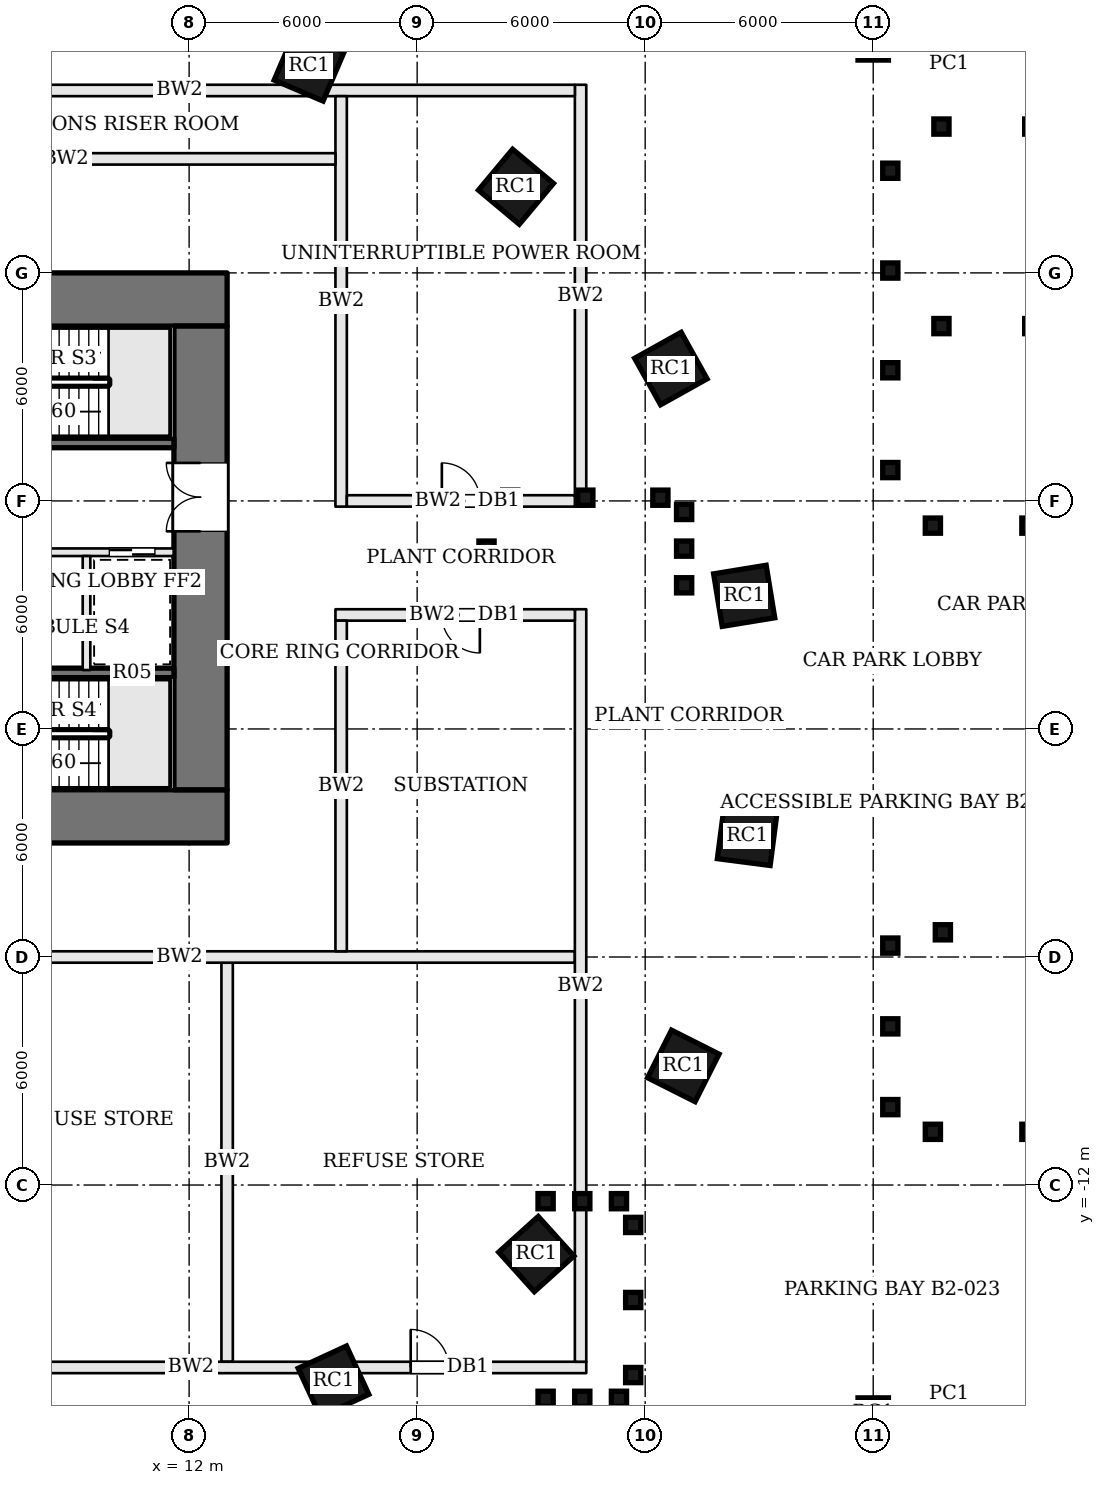
"""IFC4 building model, lengths in metres.
Left out: names, types, materials, properties, quantities, classifications, styles, units other than length and angle.
Written with IfcOpenShell. Run it as: python <this file> out.ifc"""

import sys

from ifc_helpers import new_model, si_unit, direction, frame, frame_2d, origin, origin_2d, place, context, subcontext, project, spatial, rectangle, extrude, element, fill, save


model = new_model("IFC4")
c1 = context("Model", 3, precision=1e-05, world=origin(), true_north=direction((0.0, 1.0)))
c2 = subcontext(c1, "Body", "Model", "MODEL_VIEW")
j1 = project(units=[si_unit("LENGTHUNIT", "METRE"), si_unit("PLANEANGLEUNIT", "RADIAN")], contexts=[c1])
p1 = place(None, origin())
s1 = spatial("IfcSite", under=j1, at=p1, CompositionType="ELEMENT")
p2 = place(p1, origin())
s2 = spatial("IfcBuilding", under=s1, at=p2, CompositionType="ELEMENT")
p3 = place(p2, frame((0.0, 0.0, -10.5)))
s3 = spatial("IfcBuildingStorey", under=s2, at=p3, CompositionType="ELEMENT", Elevation=-10.5)
for number, where, z_axis, x_axis in (
    (1, (30.0, -18.0, 0.0), (0.0, 0.0, 1.0), (1.0, 0.0, 0.0)),
    (2, (30.0, 18.0, 0.0), (0.0, 0.0, 1.0), (1.0, 0.0, 0.0)),
):
    element("IfcColumn", number, at=place(p3, frame(where, z_axis=z_axis, x_axis=x_axis)), inside=s3, PredefinedType="COLUMN", context=c2, shape_type="SweptSolid", body=[
        extrude(rectangle(XDim=0.8, YDim=0.8, at=origin_2d()), origin(), (0.0, 0.0, 1.0), 4.5),
    ])
p4 = place(p3, frame((-13.0, 11.3, 0.0), z_axis=(0.0, 0.0, 1.0), x_axis=(1.0, 0.0, 0.0)))
e3 = element("IfcWall", 3, at=p4, inside=s3, PredefinedType="SHEAR", context=c2, shape_type="SweptSolid", body=[
    extrude(rectangle(XDim=26.0, YDim=1.4, at=frame_2d((13.0, 0.0))), origin(), (0.0, 0.0, 1.0), 4.5),
])
p5 = place(p4, frame((9.55, 0.0, 0.0)))
e4 = element("IfcOpeningElement", 4, at=p5, cuts=e3, PredefinedType="OPENING", context=c2, shape_type="SweptSolid", body=[
    extrude(rectangle(XDim=1.2, YDim=2.1, at=frame_2d((0.6, 1.05))), frame((0.0, 0.71, 0.0), z_axis=(0.0, -1.0, 0.0), x_axis=(1.0, 0.0, 0.0)), (0.0, 0.0, 1.0), 1.42),
])
p6 = place(p4, frame((13.075, 0.0, 0.0)))
e5 = element("IfcOpeningElement", 5, at=p6, cuts=e3, PredefinedType="OPENING", context=c2, shape_type="SweptSolid", body=[
    extrude(rectangle(XDim=0.7, YDim=2.1, at=frame_2d((0.35, 1.05))), frame((0.0, 0.71, 0.0), z_axis=(0.0, -1.0, 0.0), x_axis=(1.0, 0.0, 0.0)), (0.0, 0.0, 1.0), 1.42),
])
p7 = place(p4, frame((15.925, 0.0, 0.0)))
e6 = element("IfcOpeningElement", 6, at=p7, cuts=e3, PredefinedType="OPENING", context=c2, shape_type="SweptSolid", body=[
    extrude(rectangle(XDim=0.7, YDim=2.1, at=frame_2d((0.35, 1.05))), frame((0.0, 0.71, 0.0), z_axis=(0.0, -1.0, 0.0), x_axis=(1.0, 0.0, 0.0)), (0.0, 0.0, 1.0), 1.42),
])
p8 = place(p3, frame((-13.0, -2.3, 0.0), z_axis=(0.0, 0.0, 1.0), x_axis=(1.0, 0.0, 0.0)))
e7 = element("IfcWall", 7, at=p8, inside=s3, PredefinedType="SHEAR", context=c2, shape_type="SweptSolid", body=[
    extrude(rectangle(XDim=26.0, YDim=1.4, at=frame_2d((13.0, 0.0))), origin(), (0.0, 0.0, 1.0), 4.5),
])
p9 = place(p8, frame((8.725, 0.0, 0.0)))
e8 = element("IfcOpeningElement", 8, at=p9, cuts=e7, PredefinedType="OPENING", context=c2, shape_type="SweptSolid", body=[
    extrude(rectangle(XDim=1.2, YDim=2.1, at=frame_2d((0.6, 1.05))), frame((0.0, 0.71, 0.0), z_axis=(0.0, -1.0, 0.0), x_axis=(1.0, 0.0, 0.0)), (0.0, 0.0, 1.0), 1.42),
])
p10 = place(p8, frame((12.0, 0.0, 0.0)))
e9 = element("IfcOpeningElement", 9, at=p10, cuts=e7, PredefinedType="OPENING", context=c2, shape_type="SweptSolid", body=[
    extrude(rectangle(XDim=1.2, YDim=2.1, at=frame_2d((0.6, 1.05))), frame((0.0, 0.71, 0.0), z_axis=(0.0, -1.0, 0.0), x_axis=(1.0, 0.0, 0.0)), (0.0, 0.0, 1.0), 1.42),
])
p11 = place(p8, frame((15.675, 0.0, 0.0)))
e10 = element("IfcOpeningElement", 10, at=p11, cuts=e7, PredefinedType="OPENING", context=c2, shape_type="SweptSolid", body=[
    extrude(rectangle(XDim=1.2, YDim=2.1, at=frame_2d((0.6, 1.05))), frame((0.0, 0.71, 0.0), z_axis=(0.0, -1.0, 0.0), x_axis=(1.0, 0.0, 0.0)), (0.0, 0.0, 1.0), 1.42),
])
p12 = place(p3, frame((12.3, -1.6, 0.0), z_axis=(0.0, 0.0, 1.0), x_axis=(0.0, 1.0, 0.0)))
e11 = element("IfcWall", 11, at=p12, inside=s3, PredefinedType="SHEAR", context=c2, shape_type="SweptSolid", body=[
    extrude(rectangle(XDim=12.2, YDim=1.4, at=frame_2d((6.1, 0.0))), origin(), (0.0, 0.0, 1.0), 4.5),
])
p13 = place(p12, frame((6.8, 0.0, 0.0)))
e12 = element("IfcOpeningElement", 12, at=p13, cuts=e11, PredefinedType="OPENING", context=c2, shape_type="SweptSolid", body=[
    extrude(rectangle(XDim=1.8, YDim=2.1, at=frame_2d((0.9, 1.05))), frame((0.0, 0.71, 0.0), z_axis=(0.0, -1.0, 0.0), x_axis=(1.0, 0.0, 0.0)), (0.0, 0.0, 1.0), 1.42),
])
for number, where, z_axis, x_axis in (
    (13, (26.605, 3.503, 0.0), (0.0, 0.0, 1.0), (-0.161, 0.987, 0.0)),
    (14, (24.676, 9.483, 0.0), (0.0, 0.0, 1.0), (-0.487, 0.873, 0.0)),
    (15, (20.6, 14.266, 0.0), (0.0, 0.0, 1.0), (-0.767, 0.641, 0.0)),
    (16, (15.157, 17.441, 0.0), (0.0, 0.0, 1.0), (-0.919, 0.394, 0.0)),
    (17, (15.799, -17.165, 0.0), (0.0, 0.0, 1.0), (0.908, 0.419, 0.0)),
    (18, (21.135, -13.817, 0.0), (0.0, 0.0, 1.0), (0.743, 0.67, 0.0)),
    (19, (25.003, -8.866, 0.0), (0.0, 0.0, 1.0), (0.45, 0.893, 0.0)),
    (20, (26.684, -2.808, 0.0), (0.0, 0.0, 1.0), (0.128, 0.992, 0.0)),
):
    element("IfcColumn", number, at=place(p3, frame(where, z_axis=z_axis, x_axis=x_axis)), inside=s3, PredefinedType="COLUMN", context=c2, shape_type="SweptSolid", body=[
        extrude(rectangle(XDim=1.4, YDim=1.4, at=origin_2d()), origin(), (0.0, 0.0, 1.0), 4.5),
    ])
for number, where, z_axis, x_axis in (
    (21, (32.0, 17.5, 0.0), (0.0, 0.0, 1.0), (1.0, 0.0, 0.0)),
    (22, (32.0, -17.5, 0.0), (0.0, 0.0, 1.0), (1.0, 0.0, 0.0)),
):
    element("IfcColumn", number, at=place(p3, frame(where, z_axis=z_axis, x_axis=x_axis)), inside=s3, PredefinedType="COLUMN", context=c2, shape_type="SweptSolid", body=[
        extrude(rectangle(XDim=0.4, YDim=0.4, at=origin_2d()), origin(), (0.0, 0.0, 1.0), 4.5),
    ])
p14 = place(p3, frame((11.6, 7.525, 0.0), z_axis=(0.0, 0.0, 1.0), x_axis=(-1.0, 0.0, 0.0)))
e23 = element("IfcWall", 23, at=p14, inside=s3, PredefinedType="SOLIDWALL", context=c2, shape_type="SweptSolid", body=[
    extrude(rectangle(XDim=6.5, YDim=0.25, at=frame_2d((3.25, 0.0))), origin(), (0.0, 0.0, 1.0), 4.2),
])
p15 = place(p14, frame((5.2, 0.0, 0.0)))
e24 = element("IfcOpeningElement", 24, at=p15, cuts=e23, PredefinedType="OPENING", context=c2, shape_type="SweptSolid", body=[
    extrude(rectangle(XDim=1.2, YDim=2.1, at=frame_2d((0.6, 1.05))), frame((0.0, 0.135, 0.0), z_axis=(0.0, -1.0, 0.0), x_axis=(1.0, 0.0, 0.0)), (0.0, 0.0, 1.0), 0.27),
])
p16 = place(p3, frame((11.6, 4.65, 0.0), z_axis=(0.0, 0.0, 1.0), x_axis=(-1.0, 0.0, 0.0)))
e25 = element("IfcWall", 25, at=p16, inside=s3, PredefinedType="SOLIDWALL", context=c2, shape_type="SweptSolid", body=[
    extrude(rectangle(XDim=6.5, YDim=0.2, at=frame_2d((3.25, 0.0))), origin(), (0.0, 0.0, 1.0), 4.2),
])
p17 = place(p16, frame((3.8, 0.0, 0.0)))
e26 = element("IfcOpeningElement", 26, at=p17, cuts=e25, PredefinedType="OPENING", context=c2, shape_type="SweptSolid", body=[
    extrude(rectangle(XDim=1.2, YDim=2.1, at=frame_2d((0.6, 1.05))), frame((0.0, 0.11, 0.0), z_axis=(0.0, -1.0, 0.0), x_axis=(1.0, 0.0, 0.0)), (0.0, 0.0, 1.0), 0.22),
])
p18 = place(p16, frame((0.5, 0.0, 0.0)))
e27 = element("IfcOpeningElement", 27, at=p18, cuts=e25, PredefinedType="OPENING", context=c2, shape_type="SweptSolid", body=[
    extrude(rectangle(XDim=1.2, YDim=2.1, at=frame_2d((0.6, 1.05))), frame((0.0, 0.11, 0.0), z_axis=(0.0, -1.0, 0.0), x_axis=(1.0, 0.0, 0.0)), (0.0, 0.0, 1.0), 0.22),
])
p19 = place(p3, frame((11.6, 1.475, 0.0), z_axis=(0.0, 0.0, 1.0), x_axis=(-1.0, 0.0, 0.0)))
e28 = element("IfcWall", 28, at=p19, inside=s3, PredefinedType="SOLIDWALL", context=c2, shape_type="SweptSolid", body=[
    extrude(rectangle(XDim=6.5, YDim=0.25, at=frame_2d((3.25, 0.0))), origin(), (0.0, 0.0, 1.0), 4.2),
])
p20 = place(p19, frame((5.2, 0.0, 0.0)))
e29 = element("IfcOpeningElement", 29, at=p20, cuts=e28, PredefinedType="OPENING", context=c2, shape_type="SweptSolid", body=[
    extrude(rectangle(XDim=1.2, YDim=2.1, at=frame_2d((0.6, 1.05))), frame((0.0, 0.135, 0.0), z_axis=(0.0, -1.0, 0.0), x_axis=(1.0, 0.0, 0.0)), (0.0, 0.0, 1.0), 0.27),
])
p21 = place(p3, frame((9.3, 4.55, 0.0), z_axis=(0.0, 0.0, 1.0), x_axis=(0.0, -1.0, 0.0)))
e30 = element("IfcWall", 30, at=p21, inside=s3, PredefinedType="SOLIDWALL", context=c2, shape_type="SweptSolid", body=[
    extrude(rectangle(XDim=3.0, YDim=0.2, at=frame_2d((1.5, 0.0))), origin(), (0.0, 0.0, 1.0), 4.2),
])
p22 = place(p3, frame((13.0, -16.65, 0.0), z_axis=(0.0, 0.0, 1.0), x_axis=(0.0, 1.0, 0.0)))
e31 = element("IfcWall", 31, at=p22, inside=s3, PredefinedType="SOLIDWALL", context=c2, shape_type="SweptSolid", body=[
    extrude(rectangle(XDim=10.5, YDim=0.3, at=frame_2d((5.25, 0.0))), origin(), (0.0, 0.0, 1.0), 3.48),
])
p23 = place(p3, frame((22.15, -6.0, 0.0), z_axis=(0.0, 0.0, 1.0), x_axis=(-1.0, 0.0, 0.0)))
e32 = element("IfcWall", 32, at=p23, inside=s3, PredefinedType="SOLIDWALL", context=c2, shape_type="SweptSolid", body=[
    extrude(rectangle(XDim=20.8, YDim=0.3, at=frame_2d((10.4, 0.0))), origin(), (0.0, 0.0, 1.0), 3.48),
])
p24 = place(p3, frame((1.65, -16.8, 0.0), z_axis=(0.0, 0.0, 1.0), x_axis=(1.0, 0.0, 0.0)))
e33 = element("IfcWall", 33, at=p24, inside=s3, PredefinedType="SOLIDWALL", context=c2, shape_type="SweptSolid", body=[
    extrude(rectangle(XDim=20.8, YDim=0.3, at=frame_2d((10.4, 0.0))), origin(), (0.0, 0.0, 1.0), 3.48),
])
p25 = place(p24, frame((16.18, 0.0, 0.0)))
e34 = element("IfcOpeningElement", 34, at=p25, cuts=e33, PredefinedType="OPENING", context=c2, shape_type="SweptSolid", body=[
    extrude(rectangle(XDim=1.0, YDim=2.1, at=frame_2d((0.5, 1.05))), frame((0.0, 0.16, 0.0), z_axis=(0.0, -1.0, 0.0), x_axis=(1.0, 0.0, 0.0)), (0.0, 0.0, 1.0), 0.32),
])
p26 = place(p3, frame((22.3, -16.65, 0.0), z_axis=(0.0, 0.0, 1.0), x_axis=(0.0, 1.0, 0.0)))
e35 = element("IfcWall", 35, at=p26, inside=s3, PredefinedType="SOLIDWALL", context=c2, shape_type="SweptSolid", body=[
    extrude(rectangle(XDim=19.8, YDim=0.3, at=frame_2d((9.9, 0.0))), origin(), (0.0, 0.0, 1.0), 3.48),
])
p27 = place(p3, frame((22.15, 3.0, 0.0), z_axis=(0.0, 0.0, 1.0), x_axis=(-1.0, 0.0, 0.0)))
e36 = element("IfcWall", 36, at=p27, inside=s3, PredefinedType="SOLIDWALL", context=c2, shape_type="SweptSolid", body=[
    extrude(rectangle(XDim=6.3, YDim=0.3, at=frame_2d((3.15, 0.0))), origin(), (0.0, 0.0, 1.0), 3.48),
])
p28 = place(p27, frame((2.5, 0.0, 0.0)))
e37 = element("IfcOpeningElement", 37, at=p28, cuts=e36, PredefinedType="OPENING", context=c2, shape_type="SweptSolid", body=[
    extrude(rectangle(XDim=1.0, YDim=2.1, at=frame_2d((0.5, 1.05))), frame((0.0, 0.16, 0.0), z_axis=(0.0, -1.0, 0.0), x_axis=(1.0, 0.0, 0.0)), (0.0, 0.0, 1.0), 0.32),
])
p29 = place(p3, frame((16.0, 2.85, 0.0), z_axis=(0.0, 0.0, 1.0), x_axis=(0.0, -1.0, 0.0)))
e38 = element("IfcWall", 38, at=p29, inside=s3, PredefinedType="SOLIDWALL", context=c2, shape_type="SweptSolid", body=[
    extrude(rectangle(XDim=8.7, YDim=0.3, at=frame_2d((4.35, 0.0))), origin(), (0.0, 0.0, 1.0), 3.48),
])
p30 = place(p3, frame((22.3, 5.85, 0.0), z_axis=(0.0, 0.0, 1.0), x_axis=(0.0, 1.0, 0.0)))
e39 = element("IfcWall", 39, at=p30, inside=s3, PredefinedType="SOLIDWALL", context=c2, shape_type="SweptSolid", body=[
    extrude(rectangle(XDim=11.1, YDim=0.3, at=frame_2d((5.55, 0.0))), origin(), (0.0, 0.0, 1.0), 3.48),
])
p31 = place(p3, frame((22.15, 16.8, 0.0), z_axis=(0.0, 0.0, 1.0), x_axis=(-1.0, 0.0, 0.0)))
e40 = element("IfcWall", 40, at=p31, inside=s3, PredefinedType="SOLIDWALL", context=c2, shape_type="SweptSolid", body=[
    extrude(rectangle(XDim=20.8, YDim=0.3, at=frame_2d((10.4, 0.0))), origin(), (0.0, 0.0, 1.0), 3.48),
])
p32 = place(p3, frame((16.0, 16.65, 0.0), z_axis=(0.0, 0.0, 1.0), x_axis=(0.0, -1.0, 0.0)))
e41 = element("IfcWall", 41, at=p32, inside=s3, PredefinedType="SOLIDWALL", context=c2, shape_type="SweptSolid", body=[
    extrude(rectangle(XDim=10.8, YDim=0.3, at=frame_2d((5.4, 0.0))), origin(), (0.0, 0.0, 1.0), 3.48),
])
p33 = place(p3, frame((16.15, 6.0, 0.0), z_axis=(0.0, 0.0, 1.0), x_axis=(1.0, 0.0, 0.0)))
e42 = element("IfcWall", 42, at=p33, inside=s3, PredefinedType="SOLIDWALL", context=c2, shape_type="SweptSolid", body=[
    extrude(rectangle(XDim=6.0, YDim=0.3, at=frame_2d((3.0, 0.0))), origin(), (0.0, 0.0, 1.0), 3.48),
])
p34 = place(p33, frame((2.5, 0.0, 0.0)))
e43 = element("IfcOpeningElement", 43, at=p34, cuts=e42, PredefinedType="OPENING", context=c2, shape_type="SweptSolid", body=[
    extrude(rectangle(XDim=1.0, YDim=2.1, at=frame_2d((0.5, 1.05))), frame((0.0, 0.16, 0.0), z_axis=(0.0, -1.0, 0.0), x_axis=(1.0, 0.0, 0.0)), (0.0, 0.0, 1.0), 0.32),
])
p35 = place(p3, frame((1.65, 15.0, 0.0), z_axis=(0.0, 0.0, 1.0), x_axis=(1.0, 0.0, 0.0)))
e44 = element("IfcWall", 44, at=p35, inside=s3, PredefinedType="SOLIDWALL", context=c2, shape_type="SweptSolid", body=[
    extrude(rectangle(XDim=14.2, YDim=0.3, at=frame_2d((7.1, 0.0))), origin(), (0.0, 0.0, 1.0), 3.48),
])
for number, where, z_axis, x_axis in (
    (45, (24.4, 6.085, 0.0), (0.0, 0.0, 1.0), (1.0, 0.0, 0.0)),
    (46, (20.45, 6.085, 0.0), (0.0, 0.0, 1.0), (1.0, 0.0, 0.0)),
    (47, (22.425, 6.085, 0.0), (0.0, 0.0, 1.0), (1.0, 0.0, 0.0)),
    (48, (19.825, 4.745, 0.0), (0.0, 0.0, 1.0), (1.0, 0.0, 0.0)),
    (49, (25.025, 3.78, 0.0), (0.0, 0.0, 1.0), (1.0, 0.0, 0.0)),
    (50, (25.025, 5.71, 0.0), (0.0, 0.0, 1.0), (1.0, 0.0, 0.0)),
    (51, (25.025, 4.745, 0.0), (0.0, 0.0, 1.0), (1.0, 0.0, 0.0)),
    (52, (23.685, -17.0, 0.0), (0.0, 0.0, 1.0), (1.0, 0.0, 0.0)),
    (53, (23.685, -13.05, 0.0), (0.0, 0.0, 1.0), (1.0, 0.0, 0.0)),
    (54, (23.685, -15.025, 0.0), (0.0, 0.0, 1.0), (1.0, 0.0, 0.0)),
    (55, (21.38, -17.625, 0.0), (0.0, 0.0, 1.0), (1.0, 0.0, 0.0)),
    (56, (23.31, -17.625, 0.0), (0.0, 0.0, 1.0), (1.0, 0.0, 0.0)),
    (57, (22.345, -17.625, 0.0), (0.0, 0.0, 1.0), (1.0, 0.0, 0.0)),
    (58, (21.38, -12.425, 0.0), (0.0, 0.0, 1.0), (1.0, 0.0, 0.0)),
    (59, (23.31, -12.425, 0.0), (0.0, 0.0, 1.0), (1.0, 0.0, 0.0)),
    (60, (22.345, -12.425, 0.0), (0.0, 0.0, 1.0), (1.0, 0.0, 0.0)),
    (61, (34.11, 5.35, 0.0), (0.0, 0.0, 1.0), (1.0, 0.0, 0.0)),
    (62, (31.57, 5.35, 0.0), (0.0, 0.0, 1.0), (1.0, 0.0, 0.0)),
    (63, (30.45, 6.812, 0.0), (0.0, 0.0, 1.0), (1.0, 0.0, 0.0)),
    (64, (30.45, 9.438, 0.0), (0.0, 0.0, 1.0), (1.0, 0.0, 0.0)),
    (65, (30.45, 12.062, 0.0), (0.0, 0.0, 1.0), (1.0, 0.0, 0.0)),
    (66, (30.45, 14.688, 0.0), (0.0, 0.0, 1.0), (1.0, 0.0, 0.0)),
    (67, (31.795, 10.6, 0.0), (0.0, 0.0, 1.0), (1.0, 0.0, 0.0)),
    (68, (34.185, 10.6, 0.0), (0.0, 0.0, 1.0), (1.0, 0.0, 0.0)),
    (69, (34.11, -10.6, 0.0), (0.0, 0.0, 1.0), (1.0, 0.0, 0.0)),
    (70, (31.57, -10.6, 0.0), (0.0, 0.0, 1.0), (1.0, 0.0, 0.0)),
    (71, (30.45, -9.95, 0.0), (0.0, 0.0, 1.0), (1.0, 0.0, 0.0)),
    (72, (30.45, -5.7, 0.0), (0.0, 0.0, 1.0), (1.0, 0.0, 0.0)),
    (73, (30.45, -7.825, 0.0), (0.0, 0.0, 1.0), (1.0, 0.0, 0.0)),
    (74, (31.833, -5.35, 0.0), (0.0, 0.0, 1.0), (1.0, 0.0, 0.0)),
    (75, (31.795, 15.85, 0.0), (0.0, 0.0, 1.0), (1.0, 0.0, 0.0)),
    (76, (34.185, 15.85, 0.0), (0.0, 0.0, 1.0), (1.0, 0.0, 0.0)),
):
    element("IfcColumn", number, at=place(p3, frame(where, z_axis=z_axis, x_axis=x_axis)), inside=s3, PredefinedType="COLUMN", context=c2, shape_type="SweptSolid", body=[
        extrude(rectangle(XDim=0.4, YDim=0.4, at=origin_2d()), origin(), (0.0, 0.0, 1.0), 4.5),
    ])
p36 = place(p13, origin())
e77 = element("IfcDoor", 77, at=p36, inside=s3, OperationType="DOUBLE_DOOR_SINGLE_SWING", PredefinedType="DOOR", context=c2, shape_type="SweptSolid", body=[
    extrude(rectangle(XDim=1.8, YDim=2.1, at=frame_2d((0.9, 1.05))), frame((0.0, 0.025, 0.0), z_axis=(0.0, -1.0, 0.0), x_axis=(1.0, 0.0, 0.0)), (0.0, 0.0, 1.0), 0.05),
])
fill(e12, e77)
p37 = place(p18, origin())
e78 = element("IfcDoor", 78, at=p37, inside=s3, OperationType="SLIDING_TO_RIGHT", PredefinedType="DOOR", context=c2, shape_type="SweptSolid", body=[
    extrude(rectangle(XDim=1.2, YDim=2.1, at=frame_2d((0.6, 1.05))), frame((0.0, 0.025, 0.0), z_axis=(0.0, -1.0, 0.0), x_axis=(1.0, 0.0, 0.0)), (0.0, 0.0, 1.0), 0.05),
])
fill(e27, e78)
p38 = place(p25, origin())
e79 = element("IfcDoor", 79, at=p38, inside=s3, OperationType="SINGLE_SWING_LEFT", PredefinedType="DOOR", context=c2, shape_type="SweptSolid", body=[
    extrude(rectangle(XDim=1.0, YDim=2.1, at=frame_2d((0.5, 1.05))), frame((0.0, 0.025, 0.0), z_axis=(0.0, -1.0, 0.0), x_axis=(1.0, 0.0, 0.0)), (0.0, 0.0, 1.0), 0.05),
])
fill(e34, e79)
p39 = place(p28, origin())
e80 = element("IfcDoor", 80, at=p39, inside=s3, OperationType="SINGLE_SWING_LEFT", PredefinedType="DOOR", context=c2, shape_type="SweptSolid", body=[
    extrude(rectangle(XDim=1.0, YDim=2.1, at=frame_2d((0.5, 1.05))), frame((0.0, 0.025, 0.0), z_axis=(0.0, -1.0, 0.0), x_axis=(1.0, 0.0, 0.0)), (0.0, 0.0, 1.0), 0.05),
])
fill(e37, e80)
p40 = place(p34, origin())
e81 = element("IfcDoor", 81, at=p40, inside=s3, OperationType="SINGLE_SWING_LEFT", PredefinedType="DOOR", context=c2, shape_type="SweptSolid", body=[
    extrude(rectangle(XDim=1.0, YDim=2.1, at=frame_2d((0.5, 1.05))), frame((0.0, 0.025, 0.0), z_axis=(0.0, -1.0, 0.0), x_axis=(1.0, 0.0, 0.0)), (0.0, 0.0, 1.0), 0.05),
])
fill(e43, e81)
save(model, sys.argv[1])
